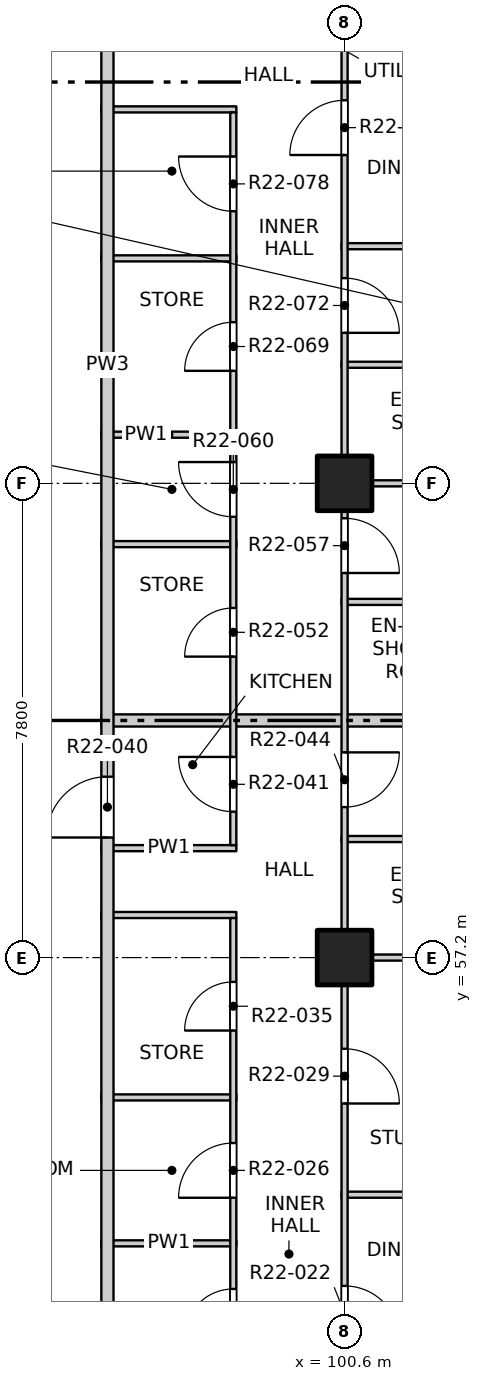
"""IFC4 building model, lengths in metres.
Left out: names, types, materials, properties, quantities, classifications, styles, units other than length and angle.
Written with IfcOpenShell. Run it as: python <this file> out.ifc"""

import sys

from ifc_helpers import new_model, si_unit, direction, frame, frame_2d, origin, origin_2d, place, context, subcontext, project, spatial, rectangle, extrude, element, fill, save


model = new_model("IFC4")
c1 = context("Model", 3, precision=1e-05, world=origin(), true_north=direction((0.0, 1.0)))
c2 = subcontext(c1, "Body", "Model", "MODEL_VIEW")
j1 = project(units=[si_unit("LENGTHUNIT", "METRE"), si_unit("PLANEANGLEUNIT", "RADIAN")], contexts=[c1])
p1 = place(None, origin())
s1 = spatial("IfcSite", under=j1, at=p1, CompositionType="ELEMENT")
p2 = place(p1, origin())
s2 = spatial("IfcBuilding", under=s1, at=p2, CompositionType="ELEMENT")
p3 = place(p2, frame((0.0, 0.0, 231.3)))
s3 = spatial("IfcBuildingStorey", under=s2, at=p3, CompositionType="ELEMENT", Elevation=231.3)
for number, where, z_axis, x_axis in (
    (1, (100.6, 57.2, -0.25), (0.0, 0.0, 1.0), (1.0, 0.0, 0.0)),
    (2, (100.6, 65.0, -0.25), (0.0, 0.0, 1.0), (1.0, 0.0, 0.0)),
):
    element("IfcColumn", number, at=place(p3, frame(where, z_axis=z_axis, x_axis=x_axis)), inside=s3, PredefinedType="COLUMN", context=c2, shape_type="SweptSolid", body=[
        extrude(rectangle(XDim=0.9, YDim=0.9, at=origin_2d()), origin(), (0.0, 0.0, 1.0), 3.4),
    ])
p4 = place(p3, frame((96.6, 52.5, 0.0), z_axis=(0.0, 0.0, 1.0), x_axis=(1.0, 0.0, 0.0)))
e3 = element("IfcWall", 3, at=p4, inside=s3, PredefinedType="PARTITIONING", context=c2, shape_type="SweptSolid", body=[
    extrude(rectangle(XDim=2.22, YDim=0.1, at=frame_2d((1.11, 0.0))), origin(), (0.0, 0.0, 1.0), 3.15),
])
p5 = place(p3, frame((100.55, 53.3, 0.0), z_axis=(0.0, 0.0, 1.0), x_axis=(1.0, 0.0, 0.0)))
e4 = element("IfcWall", 4, at=p5, inside=s3, PredefinedType="PARTITIONING", context=c2, shape_type="SweptSolid", body=[
    extrude(rectangle(XDim=7.55, YDim=0.1, at=frame_2d((3.775, 0.0))), origin(), (0.0, 0.0, 1.0), 3.15),
])
p6 = place(p3, frame((96.6, 54.9, 0.0), z_axis=(0.0, 0.0, 1.0), x_axis=(1.0, 0.0, 0.0)))
e5 = element("IfcWall", 5, at=p6, inside=s3, PredefinedType="PARTITIONING", context=c2, shape_type="SweptSolid", body=[
    extrude(rectangle(XDim=2.22, YDim=0.1, at=frame_2d((1.11, 0.0))), origin(), (0.0, 0.0, 1.0), 3.15),
])
p7 = place(p3, frame((100.55, 57.2, 0.0), z_axis=(0.0, 0.0, 1.0), x_axis=(1.0, 0.0, 0.0)))
e6 = element("IfcWall", 6, at=p7, inside=s3, PredefinedType="PARTITIONING", context=c2, shape_type="SweptSolid", body=[
    extrude(rectangle(XDim=7.55, YDim=0.1, at=frame_2d((3.775, 0.0))), origin(), (0.0, 0.0, 1.0), 3.15),
])
for number, where, z_axis, x_axis in (
    (7, (96.6, 57.9, 0.0), (0.0, 0.0, 1.0), (1.0, 0.0, 0.0)),
    (8, (96.6, 59.0, 0.0), (0.0, 0.0, 1.0), (1.0, 0.0, 0.0)),
):
    element("IfcWall", number, at=place(p3, frame(where, z_axis=z_axis, x_axis=x_axis)), inside=s3, PredefinedType="PARTITIONING", context=c2, shape_type="SweptSolid", body=[
        extrude(rectangle(XDim=2.22, YDim=0.1, at=frame_2d((1.11, 0.0))), origin(), (0.0, 0.0, 1.0), 3.15),
    ])
p8 = place(p3, frame((100.55, 59.15, 0.0), z_axis=(0.0, 0.0, 1.0), x_axis=(1.0, 0.0, 0.0)))
e9 = element("IfcWall", 9, at=p8, inside=s3, PredefinedType="PARTITIONING", context=c2, shape_type="SweptSolid", body=[
    extrude(rectangle(XDim=3.7, YDim=0.1, at=frame_2d((1.85, 0.0))), origin(), (0.0, 0.0, 1.0), 3.15),
])
p9 = place(p3, frame((96.6, 61.1, 0.0), z_axis=(0.0, 0.0, 1.0), x_axis=(1.0, 0.0, 0.0)))
e10 = element("IfcWall", 10, at=p9, inside=s3, PredefinedType="PARTITIONING", context=c2, shape_type="SweptSolid", body=[
    extrude(rectangle(XDim=11.5, YDim=0.2, at=frame_2d((5.75, 0.0))), origin(), (0.0, 0.0, 1.0), 2.55),
])
p10 = place(p3, frame((100.55, 63.05, 0.0), z_axis=(0.0, 0.0, 1.0), x_axis=(1.0, 0.0, 0.0)))
e11 = element("IfcWall", 11, at=p10, inside=s3, PredefinedType="PARTITIONING", context=c2, shape_type="SweptSolid", body=[
    extrude(rectangle(XDim=3.7, YDim=0.1, at=frame_2d((1.85, 0.0))), origin(), (0.0, 0.0, 1.0), 3.15),
])
p11 = place(p3, frame((96.6, 64.0, 0.0), z_axis=(0.0, 0.0, 1.0), x_axis=(1.0, 0.0, 0.0)))
e12 = element("IfcWall", 12, at=p11, inside=s3, PredefinedType="PARTITIONING", context=c2, shape_type="SweptSolid", body=[
    extrude(rectangle(XDim=2.22, YDim=0.1, at=frame_2d((1.11, 0.0))), origin(), (0.0, 0.0, 1.0), 3.15),
])
p12 = place(p3, frame((100.55, 65.0, 0.0), z_axis=(0.0, 0.0, 1.0), x_axis=(1.0, 0.0, 0.0)))
e13 = element("IfcWall", 13, at=p12, inside=s3, PredefinedType="PARTITIONING", context=c2, shape_type="SweptSolid", body=[
    extrude(rectangle(XDim=7.55, YDim=0.1, at=frame_2d((3.775, 0.0))), origin(), (0.0, 0.0, 1.0), 3.15),
])
p13 = place(p3, frame((96.6, 65.8, 0.0), z_axis=(0.0, 0.0, 1.0), x_axis=(1.0, 0.0, 0.0)))
e14 = element("IfcWall", 14, at=p13, inside=s3, PredefinedType="PARTITIONING", context=c2, shape_type="SweptSolid", body=[
    extrude(rectangle(XDim=2.22, YDim=0.1, at=frame_2d((1.11, 0.0))), origin(), (0.0, 0.0, 1.0), 3.15),
])
p14 = place(p3, frame((100.55, 66.95, 0.0), z_axis=(0.0, 0.0, 1.0), x_axis=(1.0, 0.0, 0.0)))
e15 = element("IfcWall", 15, at=p14, inside=s3, PredefinedType="PARTITIONING", context=c2, shape_type="SweptSolid", body=[
    extrude(rectangle(XDim=3.7, YDim=0.1, at=frame_2d((1.85, 0.0))), origin(), (0.0, 0.0, 1.0), 3.15),
])
p15 = place(p3, frame((96.6, 68.7, 0.0), z_axis=(0.0, 0.0, 1.0), x_axis=(1.0, 0.0, 0.0)))
e16 = element("IfcWall", 16, at=p15, inside=s3, PredefinedType="PARTITIONING", context=c2, shape_type="SweptSolid", body=[
    extrude(rectangle(XDim=2.22, YDim=0.1, at=frame_2d((1.11, 0.0))), origin(), (0.0, 0.0, 1.0), 2.55),
])
p16 = place(p3, frame((100.55, 68.9, 0.0), z_axis=(0.0, 0.0, 1.0), x_axis=(1.0, 0.0, 0.0)))
e17 = element("IfcWall", 17, at=p16, inside=s3, PredefinedType="PARTITIONING", context=c2, shape_type="SweptSolid", body=[
    extrude(rectangle(XDim=7.55, YDim=0.1, at=frame_2d((3.775, 0.0))), origin(), (0.0, 0.0, 1.0), 2.55),
])
p17 = place(p3, frame((96.6, 71.15, 0.0), z_axis=(0.0, 0.0, 1.0), x_axis=(1.0, 0.0, 0.0)))
e18 = element("IfcWall", 18, at=p17, inside=s3, PredefinedType="PARTITIONING", context=c2, shape_type="SweptSolid", body=[
    extrude(rectangle(XDim=2.22, YDim=0.1, at=frame_2d((1.11, 0.0))), origin(), (0.0, 0.0, 1.0), 3.15),
])
p18 = place(p3, frame((96.7, 49.5, 0.0), z_axis=(0.0, 0.0, 1.0), x_axis=(0.0, 1.0, 0.0)))
e19 = element("IfcWall", 19, at=p18, inside=s3, PredefinedType="PARTITIONING", context=c2, shape_type="SweptSolid", body=[
    extrude(rectangle(XDim=34.9, YDim=0.2, at=frame_2d((17.45, 0.0))), origin(), (0.0, 0.0, 1.0), 3.15),
])
p19 = place(p18, frame((9.675, 0.0, 0.0)))
e20 = element("IfcOpeningElement", 20, at=p19, cuts=e19, PredefinedType="OPENING", context=c2, shape_type="SweptSolid", body=[
    extrude(rectangle(XDim=1.0, YDim=2.1, at=frame_2d((0.5, 1.05))), frame((0.0, 0.11, 0.0), z_axis=(0.0, -1.0, 0.0), x_axis=(1.0, 0.0, 0.0)), (0.0, 0.0, 1.0), 0.22),
])
p20 = place(p18, frame((22.925, 0.0, 0.0)))
e21 = element("IfcOpeningElement", 21, at=p20, cuts=e19, PredefinedType="OPENING", context=c2, shape_type="SweptSolid", body=[
    extrude(rectangle(XDim=1.0, YDim=2.1, at=frame_2d((0.5, 1.05))), frame((0.0, 0.11, 0.0), z_axis=(0.0, -1.0, 0.0), x_axis=(1.0, 0.0, 0.0)), (0.0, 0.0, 1.0), 0.22),
])
p21 = place(p18, frame((33.025, 0.0, 0.0)))
e22 = element("IfcOpeningElement", 22, at=p21, cuts=e19, PredefinedType="OPENING", context=c2, shape_type="SweptSolid", body=[
    extrude(rectangle(XDim=1.0, YDim=2.1, at=frame_2d((0.5, 1.05))), frame((0.0, 0.11, 0.0), z_axis=(0.0, -1.0, 0.0), x_axis=(1.0, 0.0, 0.0)), (0.0, 0.0, 1.0), 0.22),
])
p22 = place(p3, frame((98.77, 45.55, 0.0), z_axis=(0.0, 0.0, 1.0), x_axis=(0.0, 1.0, 0.0)))
e23 = element("IfcWall", 23, at=p22, inside=s3, PredefinedType="PARTITIONING", context=c2, shape_type="SweptSolid", body=[
    extrude(rectangle(XDim=12.3, YDim=0.1, at=frame_2d((6.15, 0.0))), origin(), (0.0, 0.0, 1.0), 3.15),
])
p23 = place(p22, frame((0.4, 0.0, 0.0)))
e24 = element("IfcOpeningElement", 24, at=p23, cuts=e23, PredefinedType="OPENING", context=c2, shape_type="SweptSolid", body=[
    extrude(rectangle(XDim=0.9, YDim=2.1, at=frame_2d((0.45, 1.05))), frame((0.0, 0.06, 0.0), z_axis=(0.0, -1.0, 0.0), x_axis=(1.0, 0.0, 0.0)), (0.0, 0.0, 1.0), 0.12),
])
p24 = place(p22, frame((2.8, 0.0, 0.0)))
e25 = element("IfcOpeningElement", 25, at=p24, cuts=e23, PredefinedType="OPENING", context=c2, shape_type="SweptSolid", body=[
    extrude(rectangle(XDim=0.8, YDim=2.1, at=frame_2d((0.4, 1.05))), frame((0.0, 0.06, 0.0), z_axis=(0.0, -1.0, 0.0), x_axis=(1.0, 0.0, 0.0)), (0.0, 0.0, 1.0), 0.12),
])
p25 = place(p22, frame((5.4, 0.0, 0.0)))
e26 = element("IfcOpeningElement", 26, at=p25, cuts=e23, PredefinedType="OPENING", context=c2, shape_type="SweptSolid", body=[
    extrude(rectangle(XDim=0.8, YDim=2.1, at=frame_2d((0.4, 1.05))), frame((0.0, 0.06, 0.0), z_axis=(0.0, -1.0, 0.0), x_axis=(1.0, 0.0, 0.0)), (0.0, 0.0, 1.0), 0.12),
])
p26 = place(p22, frame((7.7, 0.0, 0.0)))
e27 = element("IfcOpeningElement", 27, at=p26, cuts=e23, PredefinedType="OPENING", context=c2, shape_type="SweptSolid", body=[
    extrude(rectangle(XDim=0.9, YDim=2.1, at=frame_2d((0.45, 1.05))), frame((0.0, 0.06, 0.0), z_axis=(0.0, -1.0, 0.0), x_axis=(1.0, 0.0, 0.0)), (0.0, 0.0, 1.0), 0.12),
])
p27 = place(p22, frame((10.45, 0.0, 0.0)))
e28 = element("IfcOpeningElement", 28, at=p27, cuts=e23, PredefinedType="OPENING", context=c2, shape_type="SweptSolid", body=[
    extrude(rectangle(XDim=0.8, YDim=2.1, at=frame_2d((0.4, 1.05))), frame((0.0, 0.06, 0.0), z_axis=(0.0, -1.0, 0.0), x_axis=(1.0, 0.0, 0.0)), (0.0, 0.0, 1.0), 0.12),
])
p28 = place(p3, frame((98.77, 59.05, 0.0), z_axis=(0.0, 0.0, 1.0), x_axis=(0.0, 1.0, 0.0)))
e29 = element("IfcWall", 29, at=p28, inside=s3, PredefinedType="PARTITIONING", context=c2, shape_type="SweptSolid", body=[
    extrude(rectangle(XDim=12.05, YDim=0.1, at=frame_2d((6.025, 0.0))), origin(), (0.0, 0.0, 1.0), 3.15),
])
p29 = place(p28, frame((0.55, 0.0, 0.0)))
e30 = element("IfcOpeningElement", 30, at=p29, cuts=e29, PredefinedType="OPENING", context=c2, shape_type="SweptSolid", body=[
    extrude(rectangle(XDim=0.9, YDim=2.1, at=frame_2d((0.45, 1.05))), frame((0.0, 0.06, 0.0), z_axis=(0.0, -1.0, 0.0), x_axis=(1.0, 0.0, 0.0)), (0.0, 0.0, 1.0), 0.12),
])
p30 = place(p28, frame((3.1, 0.0, 0.0)))
e31 = element("IfcOpeningElement", 31, at=p30, cuts=e29, PredefinedType="OPENING", context=c2, shape_type="SweptSolid", body=[
    extrude(rectangle(XDim=0.8, YDim=2.1, at=frame_2d((0.4, 1.05))), frame((0.0, 0.06, 0.0), z_axis=(0.0, -1.0, 0.0), x_axis=(1.0, 0.0, 0.0)), (0.0, 0.0, 1.0), 0.12),
])
p31 = place(p28, frame((5.4, 0.0, 0.0)))
e32 = element("IfcOpeningElement", 32, at=p31, cuts=e29, PredefinedType="OPENING", context=c2, shape_type="SweptSolid", body=[
    extrude(rectangle(XDim=0.9, YDim=2.1, at=frame_2d((0.45, 1.05))), frame((0.0, 0.06, 0.0), z_axis=(0.0, -1.0, 0.0), x_axis=(1.0, 0.0, 0.0)), (0.0, 0.0, 1.0), 0.12),
])
p32 = place(p28, frame((7.8, 0.0, 0.0)))
e33 = element("IfcOpeningElement", 33, at=p32, cuts=e29, PredefinedType="OPENING", context=c2, shape_type="SweptSolid", body=[
    extrude(rectangle(XDim=0.8, YDim=2.1, at=frame_2d((0.4, 1.05))), frame((0.0, 0.06, 0.0), z_axis=(0.0, -1.0, 0.0), x_axis=(1.0, 0.0, 0.0)), (0.0, 0.0, 1.0), 0.12),
])
p33 = place(p28, frame((10.425, 0.0, 0.0)))
e34 = element("IfcOpeningElement", 34, at=p33, cuts=e29, PredefinedType="OPENING", context=c2, shape_type="SweptSolid", body=[
    extrude(rectangle(XDim=0.9, YDim=2.1, at=frame_2d((0.45, 1.05))), frame((0.0, 0.06, 0.0), z_axis=(0.0, -1.0, 0.0), x_axis=(1.0, 0.0, 0.0)), (0.0, 0.0, 1.0), 0.12),
])
p34 = place(p3, frame((100.6, 41.9, 0.0), z_axis=(0.0, 0.0, 1.0), x_axis=(0.0, 1.0, 0.0)))
e35 = element("IfcWall", 35, at=p34, inside=s3, PredefinedType="PARTITIONING", context=c2, shape_type="SweptSolid", body=[
    extrude(rectangle(XDim=46.2, YDim=0.1, at=frame_2d((23.1, 0.0))), origin(), (0.0, 0.0, 1.0), 3.15),
])
p35 = place(p34, frame((1.2, 0.0, 0.0)))
e36 = element("IfcOpeningElement", 36, at=p35, cuts=e35, PredefinedType="OPENING", context=c2, shape_type="SweptSolid", body=[
    extrude(rectangle(XDim=0.9, YDim=2.1, at=frame_2d((0.45, 1.05))), frame((0.0, 0.06, 0.0), z_axis=(0.0, -1.0, 0.0), x_axis=(1.0, 0.0, 0.0)), (0.0, 0.0, 1.0), 0.12),
])
p36 = place(p34, frame((6.025, 0.0, 0.0)))
e37 = element("IfcOpeningElement", 37, at=p36, cuts=e35, PredefinedType="OPENING", context=c2, shape_type="SweptSolid", body=[
    extrude(rectangle(XDim=0.9, YDim=2.1, at=frame_2d((0.45, 1.05))), frame((0.0, 0.06, 0.0), z_axis=(0.0, -1.0, 0.0), x_axis=(1.0, 0.0, 0.0)), (0.0, 0.0, 1.0), 0.12),
])
p37 = place(p34, frame((9.0, 0.0, 0.0)))
e38 = element("IfcOpeningElement", 38, at=p37, cuts=e35, PredefinedType="OPENING", context=c2, shape_type="SweptSolid", body=[
    extrude(rectangle(XDim=0.9, YDim=2.1, at=frame_2d((0.45, 1.05))), frame((0.0, 0.06, 0.0), z_axis=(0.0, -1.0, 0.0), x_axis=(1.0, 0.0, 0.0)), (0.0, 0.0, 1.0), 0.12),
])
p38 = place(p34, frame((12.9, 0.0, 0.0)))
e39 = element("IfcOpeningElement", 39, at=p38, cuts=e35, PredefinedType="OPENING", context=c2, shape_type="SweptSolid", body=[
    extrude(rectangle(XDim=0.9, YDim=2.1, at=frame_2d((0.45, 1.05))), frame((0.0, 0.06, 0.0), z_axis=(0.0, -1.0, 0.0), x_axis=(1.0, 0.0, 0.0)), (0.0, 0.0, 1.0), 0.12),
])
p39 = place(p34, frame((17.775, 0.0, 0.0)))
e40 = element("IfcOpeningElement", 40, at=p39, cuts=e35, PredefinedType="OPENING", context=c2, shape_type="SweptSolid", body=[
    extrude(rectangle(XDim=0.9, YDim=2.1, at=frame_2d((0.45, 1.05))), frame((0.0, 0.06, 0.0), z_axis=(0.0, -1.0, 0.0), x_axis=(1.0, 0.0, 0.0)), (0.0, 0.0, 1.0), 0.12),
])
p40 = place(p34, frame((21.625, 0.0, 0.0)))
e41 = element("IfcOpeningElement", 41, at=p40, cuts=e35, PredefinedType="OPENING", context=c2, shape_type="SweptSolid", body=[
    extrude(rectangle(XDim=0.9, YDim=2.1, at=frame_2d((0.45, 1.05))), frame((0.0, 0.06, 0.0), z_axis=(0.0, -1.0, 0.0), x_axis=(1.0, 0.0, 0.0)), (0.0, 0.0, 1.0), 0.12),
])
p41 = place(p34, frame((25.575, 0.0, 0.0)))
e42 = element("IfcOpeningElement", 42, at=p41, cuts=e35, PredefinedType="OPENING", context=c2, shape_type="SweptSolid", body=[
    extrude(rectangle(XDim=0.9, YDim=2.1, at=frame_2d((0.45, 1.05))), frame((0.0, 0.06, 0.0), z_axis=(0.0, -1.0, 0.0), x_axis=(1.0, 0.0, 0.0)), (0.0, 0.0, 1.0), 0.12),
])
p42 = place(p34, frame((28.5, 0.0, 0.0)))
e43 = element("IfcOpeningElement", 43, at=p42, cuts=e35, PredefinedType="OPENING", context=c2, shape_type="SweptSolid", body=[
    extrude(rectangle(XDim=0.9, YDim=2.1, at=frame_2d((0.45, 1.05))), frame((0.0, 0.06, 0.0), z_axis=(0.0, -1.0, 0.0), x_axis=(1.0, 0.0, 0.0)), (0.0, 0.0, 1.0), 0.12),
])
p43 = place(p34, frame((33.375, 0.0, 0.0)))
e44 = element("IfcOpeningElement", 44, at=p43, cuts=e35, PredefinedType="OPENING", context=c2, shape_type="SweptSolid", body=[
    extrude(rectangle(XDim=0.9, YDim=2.1, at=frame_2d((0.45, 1.05))), frame((0.0, 0.06, 0.0), z_axis=(0.0, -1.0, 0.0), x_axis=(1.0, 0.0, 0.0)), (0.0, 0.0, 1.0), 0.12),
])
p44 = place(p34, frame((36.3, 0.0, 0.0)))
e45 = element("IfcOpeningElement", 45, at=p44, cuts=e35, PredefinedType="OPENING", context=c2, shape_type="SweptSolid", body=[
    extrude(rectangle(XDim=0.9, YDim=2.1, at=frame_2d((0.45, 1.05))), frame((0.0, 0.06, 0.0), z_axis=(0.0, -1.0, 0.0), x_axis=(1.0, 0.0, 0.0)), (0.0, 0.0, 1.0), 0.12),
])
p45 = place(p34, frame((40.2, 0.0, 0.0)))
e46 = element("IfcOpeningElement", 46, at=p45, cuts=e35, PredefinedType="OPENING", context=c2, shape_type="SweptSolid", body=[
    extrude(rectangle(XDim=0.9, YDim=2.1, at=frame_2d((0.45, 1.05))), frame((0.0, 0.06, 0.0), z_axis=(0.0, -1.0, 0.0), x_axis=(1.0, 0.0, 0.0)), (0.0, 0.0, 1.0), 0.12),
])
p46 = place(p34, frame((44.1, 0.0, 0.0)))
e47 = element("IfcOpeningElement", 47, at=p46, cuts=e35, PredefinedType="OPENING", context=c2, shape_type="SweptSolid", body=[
    extrude(rectangle(XDim=0.9, YDim=2.1, at=frame_2d((0.45, 1.05))), frame((0.0, 0.06, 0.0), z_axis=(0.0, -1.0, 0.0), x_axis=(1.0, 0.0, 0.0)), (0.0, 0.0, 1.0), 0.12),
])
p47 = place(p25, origin())
e48 = element("IfcDoor", 48, at=p47, inside=s3, OperationType="SINGLE_SWING_LEFT", PredefinedType="DOOR", context=c2, shape_type="SweptSolid", body=[
    extrude(rectangle(XDim=0.8, YDim=2.1, at=frame_2d((0.4, 1.05))), frame((0.0, 0.025, 0.0), z_axis=(0.0, -1.0, 0.0), x_axis=(1.0, 0.0, 0.0)), (0.0, 0.0, 1.0), 0.05),
])
fill(e26, e48)
p48 = place(p37, origin())
e49 = element("IfcDoor", 49, at=p48, inside=s3, OperationType="SINGLE_SWING_RIGHT", PredefinedType="DOOR", context=c2, shape_type="SweptSolid", body=[
    extrude(rectangle(XDim=0.9, YDim=2.1, at=frame_2d((0.45, 1.05))), frame((0.0, 0.025, 0.0), z_axis=(0.0, -1.0, 0.0), x_axis=(1.0, 0.0, 0.0)), (0.0, 0.0, 1.0), 0.05),
])
fill(e38, e49)
p49 = place(p26, origin())
e50 = element("IfcDoor", 50, at=p49, inside=s3, OperationType="SINGLE_SWING_LEFT", PredefinedType="DOOR", context=c2, shape_type="SweptSolid", body=[
    extrude(rectangle(XDim=0.9, YDim=2.1, at=frame_2d((0.45, 1.05))), frame((0.0, 0.025, 0.0), z_axis=(0.0, -1.0, 0.0), x_axis=(1.0, 0.0, 0.0)), (0.0, 0.0, 1.0), 0.05),
])
fill(e27, e50)
p50 = place(p38, origin())
e51 = element("IfcDoor", 51, at=p50, inside=s3, OperationType="SINGLE_SWING_RIGHT", PredefinedType="DOOR", context=c2, shape_type="SweptSolid", body=[
    extrude(rectangle(XDim=0.9, YDim=2.1, at=frame_2d((0.45, 1.05))), frame((0.0, 0.025, 0.0), z_axis=(0.0, -1.0, 0.0), x_axis=(1.0, 0.0, 0.0)), (0.0, 0.0, 1.0), 0.05),
])
fill(e39, e51)
p51 = place(p27, origin())
e52 = element("IfcDoor", 52, at=p51, inside=s3, OperationType="SINGLE_SWING_LEFT", PredefinedType="DOOR", context=c2, shape_type="SweptSolid", body=[
    extrude(rectangle(XDim=0.8, YDim=2.1, at=frame_2d((0.4, 1.05))), frame((0.0, 0.025, 0.0), z_axis=(0.0, -1.0, 0.0), x_axis=(1.0, 0.0, 0.0)), (0.0, 0.0, 1.0), 0.05),
])
fill(e28, e52)
p52 = place(p19, origin())
e53 = element("IfcDoor", 53, at=p52, inside=s3, OperationType="SINGLE_SWING_LEFT", PredefinedType="DOOR", context=c2, shape_type="SweptSolid", body=[
    extrude(rectangle(XDim=1.0, YDim=2.1, at=frame_2d((0.5, 1.05))), frame((0.0, 0.025, 0.0), z_axis=(0.0, -1.0, 0.0), x_axis=(1.0, 0.0, 0.0)), (0.0, 0.0, 1.0), 0.05),
])
fill(e20, e53)
p53 = place(p29, origin())
e54 = element("IfcDoor", 54, at=p53, inside=s3, OperationType="SINGLE_SWING_RIGHT", PredefinedType="DOOR", context=c2, shape_type="SweptSolid", body=[
    extrude(rectangle(XDim=0.9, YDim=2.1, at=frame_2d((0.45, 1.05))), frame((0.0, 0.025, 0.0), z_axis=(0.0, -1.0, 0.0), x_axis=(1.0, 0.0, 0.0)), (0.0, 0.0, 1.0), 0.05),
])
fill(e30, e54)
p54 = place(p39, origin())
e55 = element("IfcDoor", 55, at=p54, inside=s3, OperationType="SINGLE_SWING_LEFT", PredefinedType="DOOR", context=c2, shape_type="SweptSolid", body=[
    extrude(rectangle(XDim=0.9, YDim=2.1, at=frame_2d((0.45, 1.05))), frame((0.0, 0.025, 0.0), z_axis=(0.0, -1.0, 0.0), x_axis=(1.0, 0.0, 0.0)), (0.0, 0.0, 1.0), 0.05),
])
fill(e40, e55)
p55 = place(p30, origin())
e56 = element("IfcDoor", 56, at=p55, inside=s3, OperationType="SINGLE_SWING_LEFT", PredefinedType="DOOR", context=c2, shape_type="SweptSolid", body=[
    extrude(rectangle(XDim=0.8, YDim=2.1, at=frame_2d((0.4, 1.05))), frame((0.0, 0.025, 0.0), z_axis=(0.0, -1.0, 0.0), x_axis=(1.0, 0.0, 0.0)), (0.0, 0.0, 1.0), 0.05),
])
fill(e31, e56)
p56 = place(p40, origin())
e57 = element("IfcDoor", 57, at=p56, inside=s3, OperationType="SINGLE_SWING_RIGHT", PredefinedType="DOOR", context=c2, shape_type="SweptSolid", body=[
    extrude(rectangle(XDim=0.9, YDim=2.1, at=frame_2d((0.45, 1.05))), frame((0.0, 0.025, 0.0), z_axis=(0.0, -1.0, 0.0), x_axis=(1.0, 0.0, 0.0)), (0.0, 0.0, 1.0), 0.05),
])
fill(e41, e57)
p57 = place(p31, origin())
e58 = element("IfcDoor", 58, at=p57, inside=s3, OperationType="SINGLE_SWING_RIGHT", PredefinedType="DOOR", context=c2, shape_type="SweptSolid", body=[
    extrude(rectangle(XDim=0.9, YDim=2.1, at=frame_2d((0.45, 1.05))), frame((0.0, 0.025, 0.0), z_axis=(0.0, -1.0, 0.0), x_axis=(1.0, 0.0, 0.0)), (0.0, 0.0, 1.0), 0.05),
])
fill(e32, e58)
p58 = place(p32, origin())
e59 = element("IfcDoor", 59, at=p58, inside=s3, OperationType="SINGLE_SWING_LEFT", PredefinedType="DOOR", context=c2, shape_type="SweptSolid", body=[
    extrude(rectangle(XDim=0.8, YDim=2.1, at=frame_2d((0.4, 1.05))), frame((0.0, 0.025, 0.0), z_axis=(0.0, -1.0, 0.0), x_axis=(1.0, 0.0, 0.0)), (0.0, 0.0, 1.0), 0.05),
])
fill(e33, e59)
p59 = place(p41, origin())
e60 = element("IfcDoor", 60, at=p59, inside=s3, OperationType="SINGLE_SWING_RIGHT", PredefinedType="DOOR", context=c2, shape_type="SweptSolid", body=[
    extrude(rectangle(XDim=0.9, YDim=2.1, at=frame_2d((0.45, 1.05))), frame((0.0, 0.025, 0.0), z_axis=(0.0, -1.0, 0.0), x_axis=(1.0, 0.0, 0.0)), (0.0, 0.0, 1.0), 0.05),
])
fill(e42, e60)
p60 = place(p33, origin())
e61 = element("IfcDoor", 61, at=p60, inside=s3, OperationType="SINGLE_SWING_RIGHT", PredefinedType="DOOR", context=c2, shape_type="SweptSolid", body=[
    extrude(rectangle(XDim=0.9, YDim=2.1, at=frame_2d((0.45, 1.05))), frame((0.0, 0.025, 0.0), z_axis=(0.0, -1.0, 0.0), x_axis=(1.0, 0.0, 0.0)), (0.0, 0.0, 1.0), 0.05),
])
fill(e34, e61)
p61 = place(p42, origin())
e62 = element("IfcDoor", 62, at=p61, inside=s3, OperationType="SINGLE_SWING_LEFT", PredefinedType="DOOR", context=c2, shape_type="SweptSolid", body=[
    extrude(rectangle(XDim=0.9, YDim=2.1, at=frame_2d((0.45, 1.05))), frame((0.0, 0.025, 0.0), z_axis=(0.0, -1.0, 0.0), x_axis=(1.0, 0.0, 0.0)), (0.0, 0.0, 1.0), 0.05),
])
fill(e43, e62)
save(model, sys.argv[1])
